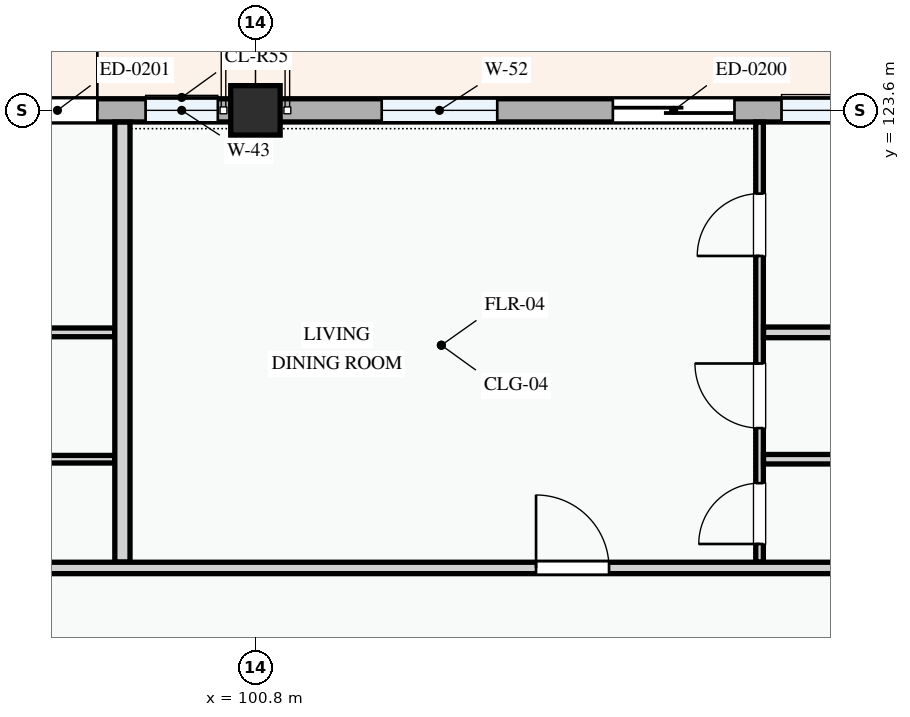
"""IFC4 building model, lengths in metres.
Left out: names, types, materials, properties, quantities, classifications, styles, units other than length and angle.
Written with IfcOpenShell. Run it as: python <this file> out.ifc"""

import sys

from ifc_helpers import new_model, si_unit, direction, frame, frame_2d, origin, origin_2d, place, context, subcontext, project, spatial, rectangle, extrude, element, fill, save


model = new_model("IFC4")
c1 = context("Model", 3, precision=1e-05, world=origin(), true_north=direction((0.0, 1.0)))
c2 = subcontext(c1, "Body", "Model", "MODEL_VIEW")
j1 = project(units=[si_unit("LENGTHUNIT", "METRE"), si_unit("PLANEANGLEUNIT", "RADIAN")], contexts=[c1])
p1 = place(None, origin())
s1 = spatial("IfcSite", under=j1, at=p1, CompositionType="ELEMENT")
p2 = place(p1, origin())
s2 = spatial("IfcBuilding", under=s1, at=p2, CompositionType="ELEMENT")
p3 = place(p2, frame((0.0, 0.0, 21.3)))
s3 = spatial("IfcBuildingStorey", under=s2, at=p3, CompositionType="ELEMENT", Elevation=21.3)
p4 = place(p3, frame((100.8, 123.6, 0.0), z_axis=(0.0, 0.0, 1.0), x_axis=(1.0, 0.0, 0.0)))
e1 = element("IfcColumn", 1, at=p4, inside=s3, PredefinedType="COLUMN", context=c2, shape_type="SweptSolid", body=[
    extrude(rectangle(XDim=0.65, YDim=0.65, at=origin_2d()), origin(), (0.0, 0.0, 1.0), 3.3),
])
p5 = place(p3, frame((109.2, 123.6, 0.0), z_axis=(0.0, 0.0, 1.0), x_axis=(-1.0, 0.0, 0.0)))
e2 = element("IfcWall", 2, at=p5, inside=s3, PredefinedType="STANDARD", context=c2, shape_type="SweptSolid", body=[
    extrude(rectangle(XDim=8.4, YDim=0.305, at=frame_2d((4.2, 0.0))), origin(), (0.0, 0.0, 1.0), 2.345),
])
p6 = place(p5, frame((2.098, 0.0, 0.0)))
e3 = element("IfcOpeningElement", 3, at=p6, cuts=e2, PredefinedType="OPENING", context=c2, shape_type="SweptSolid", body=[
    extrude(rectangle(XDim=1.6, YDim=2.2, at=frame_2d((0.8, 1.1))), frame((0.0, 0.163, 0.0), z_axis=(0.0, -1.0, 0.0), x_axis=(1.0, 0.0, 0.0)), (0.0, 0.0, 1.0), 0.325),
])
p7 = place(p5, frame((0.479, 0.0, 0.78)))
e4 = element("IfcOpeningElement", 4, at=p7, cuts=e2, PredefinedType="OPENING", context=c2, shape_type="SweptSolid", body=[
    extrude(rectangle(XDim=1.0, YDim=1.25, at=frame_2d((0.5, 0.625))), frame((0.0, 0.163, 0.0), z_axis=(0.0, -1.0, 0.0), x_axis=(1.0, 0.0, 0.0)), (0.0, 0.0, 1.0), 0.325),
])
p8 = place(p5, frame((5.219, 0.0, 0.78)))
e5 = element("IfcOpeningElement", 5, at=p8, cuts=e2, PredefinedType="OPENING", context=c2, shape_type="SweptSolid", body=[
    extrude(rectangle(XDim=1.52, YDim=1.42, at=frame_2d((0.76, 0.71))), frame((0.0, 0.163, 0.0), z_axis=(0.0, -1.0, 0.0), x_axis=(1.0, 0.0, 0.0)), (0.0, 0.0, 1.0), 0.325),
])
p9 = place(p3, frame((100.8, 123.6, 0.0), z_axis=(0.0, 0.0, 1.0), x_axis=(-1.0, 0.0, 0.0)))
e6 = element("IfcWall", 6, at=p9, inside=s3, PredefinedType="STANDARD", context=c2, shape_type="SweptSolid", body=[
    extrude(rectangle(XDim=6.0, YDim=0.305, at=frame_2d((3.0, 0.0))), origin(), (0.0, 0.0, 1.0), 2.445),
])
p10 = place(p9, frame((2.08, 0.0, 0.0)))
e7 = element("IfcOpeningElement", 7, at=p10, cuts=e6, PredefinedType="OPENING", context=c2, shape_type="SweptSolid", body=[
    extrude(rectangle(XDim=1.05, YDim=2.15, at=frame_2d((0.525, 1.075))), frame((0.0, 0.163, 0.0), z_axis=(0.0, -1.0, 0.0), x_axis=(1.0, 0.0, 0.0)), (0.0, 0.0, 1.0), 0.325),
])
p11 = place(p9, frame((0.495, 0.0, 0.78)))
e8 = element("IfcOpeningElement", 8, at=p11, cuts=e6, PredefinedType="OPENING", context=c2, shape_type="SweptSolid", body=[
    extrude(rectangle(XDim=0.95, YDim=1.15, at=frame_2d((0.475, 0.575))), frame((0.0, 0.163, 0.0), z_axis=(0.0, -1.0, 0.0), x_axis=(1.0, 0.0, 0.0)), (0.0, 0.0, 1.0), 0.325),
])
p12 = place(p9, frame((3.895, 0.0, 0.78)))
e9 = element("IfcOpeningElement", 9, at=p12, cuts=e6, PredefinedType="OPENING", context=c2, shape_type="SweptSolid", body=[
    extrude(rectangle(XDim=1.2, YDim=1.5, at=frame_2d((0.6, 0.75))), frame((0.0, 0.163, 0.0), z_axis=(0.0, -1.0, 0.0), x_axis=(1.0, 0.0, 0.0)), (0.0, 0.0, 1.0), 0.325),
])
p13 = place(p3, frame((89.448, 120.679, 0.0), z_axis=(0.0, 0.0, 1.0), x_axis=(1.0, 0.0, 0.0)))
e10 = element("IfcWall", 10, at=p13, inside=s3, PredefinedType="PARTITIONING", context=c2, shape_type="SweptSolid", body=[
    extrude(rectangle(XDim=9.5, YDim=0.115, at=frame_2d((4.75, 0.0))), origin(), (0.0, 0.0, 1.0), 3.0),
])
p14 = place(p3, frame((89.448, 119.01, 0.0), z_axis=(0.0, 0.0, 1.0), x_axis=(1.0, 0.0, 0.0)))
e11 = element("IfcWall", 11, at=p14, inside=s3, PredefinedType="PARTITIONING", context=c2, shape_type="SweptSolid", body=[
    extrude(rectangle(XDim=9.5, YDim=0.1, at=frame_2d((4.75, 0.0))), origin(), (0.0, 0.0, 1.0), 3.0),
])
p15 = place(p3, frame((107.432, 117.657, 0.0), z_axis=(0.0, 0.0, 1.0), x_axis=(0.0, 1.0, 0.0)))
e12 = element("IfcWall", 12, at=p15, inside=s3, PredefinedType="PARTITIONING", context=c2, shape_type="SweptSolid", body=[
    extrude(rectangle(XDim=5.789, YDim=0.1, at=frame_2d((2.894, 0.0))), origin(), (0.0, 0.0, 1.0), 3.0),
])
p16 = place(p15, frame((0.238, 0.0, 0.0)))
e13 = element("IfcOpeningElement", 13, at=p16, cuts=e12, PredefinedType="OPENING", context=c2, shape_type="SweptSolid", body=[
    extrude(rectangle(XDim=0.8, YDim=2.1, at=frame_2d((0.4, 1.05))), frame((0.0, 0.06, 0.0), z_axis=(0.0, -1.0, 0.0), x_axis=(1.0, 0.0, 0.0)), (0.0, 0.0, 1.0), 0.12),
])
p17 = place(p15, frame((1.763, 0.0, 0.0)))
e14 = element("IfcOpeningElement", 14, at=p17, cuts=e12, PredefinedType="OPENING", context=c2, shape_type="SweptSolid", body=[
    extrude(rectangle(XDim=0.85, YDim=2.1, at=frame_2d((0.425, 1.05))), frame((0.0, 0.06, 0.0), z_axis=(0.0, -1.0, 0.0), x_axis=(1.0, 0.0, 0.0)), (0.0, 0.0, 1.0), 0.12),
])
p18 = place(p15, frame((4.028, 0.0, 0.0)))
e15 = element("IfcOpeningElement", 15, at=p18, cuts=e12, PredefinedType="OPENING", context=c2, shape_type="SweptSolid", body=[
    extrude(rectangle(XDim=0.82, YDim=2.08, at=frame_2d((0.41, 1.04))), frame((0.0, 0.06, 0.0), z_axis=(0.0, -1.0, 0.0), x_axis=(1.0, 0.0, 0.0)), (0.0, 0.0, 1.0), 0.12),
])
p19 = place(p3, frame((107.484, 120.679, 0.0), z_axis=(0.0, 0.0, 1.0), x_axis=(1.0, 0.0, 0.0)))
e16 = element("IfcWall", 16, at=p19, inside=s3, PredefinedType="PARTITIONING", context=c2, shape_type="SweptSolid", body=[
    extrude(rectangle(XDim=11.851, YDim=0.14, at=frame_2d((5.926, 0.0))), origin(), (0.0, 0.0, 1.0), 3.0),
])
p20 = place(p3, frame((107.484, 119.01, 0.0), z_axis=(0.0, 0.0, 1.0), x_axis=(1.0, 0.0, 0.0)))
e17 = element("IfcWall", 17, at=p20, inside=s3, PredefinedType="PARTITIONING", context=c2, shape_type="SweptSolid", body=[
    extrude(rectangle(XDim=11.851, YDim=0.125, at=frame_2d((5.926, 0.0))), origin(), (0.0, 0.0, 1.0), 3.0),
])
p21 = place(p3, frame((99.05, 117.657, 0.0), z_axis=(0.0, 0.0, 1.0), x_axis=(0.0, 1.0, 0.0)))
e18 = element("IfcWall", 18, at=p21, inside=s3, PredefinedType="PARTITIONING", context=c2, shape_type="SweptSolid", body=[
    extrude(rectangle(XDim=5.789, YDim=0.2, at=frame_2d((2.894, 0.0))), origin(), (0.0, 0.0, 1.0), 3.0),
])
p22 = place(p3, frame((80.554, 117.58, 0.0), z_axis=(0.0, 0.0, 1.0), x_axis=(1.0, 0.0, 0.0)))
e19 = element("IfcWall", 19, at=p22, inside=s3, PredefinedType="PARTITIONING", context=c2, shape_type="SweptSolid", body=[
    extrude(rectangle(XDim=71.986, YDim=0.15, at=frame_2d((35.993, 0.0))), origin(), (0.0, 0.0, 1.0), 3.0),
])
p23 = place(p22, frame((2.254, 0.0, 0.0)))
e20 = element("IfcOpeningElement", 20, at=p23, cuts=e19, PredefinedType="OPENING", context=c2, shape_type="SweptSolid", body=[
    extrude(rectangle(XDim=0.92, YDim=2.1, at=frame_2d((0.46, 1.05))), frame((0.0, 0.085, 0.0), z_axis=(0.0, -1.0, 0.0), x_axis=(1.0, 0.0, 0.0)), (0.0, 0.0, 1.0), 0.17),
])
p24 = place(p22, frame((23.937, 0.0, 0.0)))
e21 = element("IfcOpeningElement", 21, at=p24, cuts=e19, PredefinedType="OPENING", context=c2, shape_type="SweptSolid", body=[
    extrude(rectangle(XDim=0.96, YDim=2.12, at=frame_2d((0.48, 1.06))), frame((0.0, 0.085, 0.0), z_axis=(0.0, -1.0, 0.0), x_axis=(1.0, 0.0, 0.0)), (0.0, 0.0, 1.0), 0.17),
])
p25 = place(p22, frame((39.125, 0.0, 0.0)))
e22 = element("IfcOpeningElement", 22, at=p25, cuts=e19, PredefinedType="OPENING", context=c2, shape_type="SweptSolid", body=[
    extrude(rectangle(XDim=0.92, YDim=2.1, at=frame_2d((0.46, 1.05))), frame((0.0, 0.085, 0.0), z_axis=(0.0, -1.0, 0.0), x_axis=(1.0, 0.0, 0.0)), (0.0, 0.0, 1.0), 0.17),
])
p26 = place(p22, frame((59.922, 0.0, 0.0)))
e23 = element("IfcOpeningElement", 23, at=p26, cuts=e19, PredefinedType="OPENING", context=c2, shape_type="SweptSolid", body=[
    extrude(rectangle(XDim=0.92, YDim=2.1, at=frame_2d((0.46, 1.05))), frame((0.0, 0.085, 0.0), z_axis=(0.0, -1.0, 0.0), x_axis=(1.0, 0.0, 0.0)), (0.0, 0.0, 1.0), 0.17),
])
p27 = place(p6, frame((1.6, 0.0, 0.0), z_axis=(0.0, 0.0, 1.0), x_axis=(-1.0, 0.0, 0.0)))
e24 = element("IfcDoor", 24, at=p27, inside=s3, OperationType="SLIDING_TO_LEFT", PredefinedType="DOOR", context=c2, shape_type="SweptSolid", body=[
    extrude(rectangle(XDim=1.6, YDim=2.2, at=frame_2d((0.8, 1.1))), frame((0.0, 0.025, 0.0), z_axis=(0.0, -1.0, 0.0), x_axis=(1.0, 0.0, 0.0)), (0.0, 0.0, 1.0), 0.05),
])
fill(e3, e24)
p28 = place(p7, origin())
e25 = element("IfcWindow", 25, at=p28, inside=s3, PartitioningType="SINGLE_PANEL", PredefinedType="WINDOW", context=c2, shape_type="SweptSolid", body=[
    extrude(rectangle(XDim=1.0, YDim=1.25, at=frame_2d((0.5, 0.625))), frame((0.0, 0.03, 0.0), z_axis=(0.0, -1.0, 0.0), x_axis=(1.0, 0.0, 0.0)), (0.0, 0.0, 1.0), 0.06),
])
fill(e4, e25)
p29 = place(p8, origin())
e26 = element("IfcWindow", 26, at=p29, inside=s3, PartitioningType="SINGLE_PANEL", PredefinedType="WINDOW", context=c2, shape_type="SweptSolid", body=[
    extrude(rectangle(XDim=1.52, YDim=1.42, at=frame_2d((0.76, 0.71))), frame((0.0, 0.03, 0.0), z_axis=(0.0, -1.0, 0.0), x_axis=(1.0, 0.0, 0.0)), (0.0, 0.0, 1.0), 0.06),
])
fill(e5, e26)
p30 = place(p10, frame((1.05, 0.0, 0.0), z_axis=(0.0, 0.0, 1.0), x_axis=(-1.0, 0.0, 0.0)))
e27 = element("IfcDoor", 27, at=p30, inside=s3, OperationType="SINGLE_SWING_RIGHT", PredefinedType="DOOR", context=c2, shape_type="SweptSolid", body=[
    extrude(rectangle(XDim=1.05, YDim=2.15, at=frame_2d((0.525, 1.075))), frame((0.0, 0.025, 0.0), z_axis=(0.0, -1.0, 0.0), x_axis=(1.0, 0.0, 0.0)), (0.0, 0.0, 1.0), 0.05),
])
fill(e7, e27)
p31 = place(p11, origin())
e28 = element("IfcWindow", 28, at=p31, inside=s3, PartitioningType="SINGLE_PANEL", PredefinedType="WINDOW", context=c2, shape_type="SweptSolid", body=[
    extrude(rectangle(XDim=0.95, YDim=1.15, at=frame_2d((0.475, 0.575))), frame((0.0, 0.03, 0.0), z_axis=(0.0, -1.0, 0.0), x_axis=(1.0, 0.0, 0.0)), (0.0, 0.0, 1.0), 0.06),
])
fill(e8, e28)
p32 = place(p16, origin())
e29 = element("IfcDoor", 29, at=p32, inside=s3, OperationType="SINGLE_SWING_LEFT", PredefinedType="DOOR", context=c2, shape_type="SweptSolid", body=[
    extrude(rectangle(XDim=0.8, YDim=2.1, at=frame_2d((0.4, 1.05))), frame((0.0, 0.025, 0.0), z_axis=(0.0, -1.0, 0.0), x_axis=(1.0, 0.0, 0.0)), (0.0, 0.0, 1.0), 0.05),
])
fill(e13, e29)
p33 = place(p17, origin())
e30 = element("IfcDoor", 30, at=p33, inside=s3, OperationType="SINGLE_SWING_RIGHT", PredefinedType="DOOR", context=c2, shape_type="SweptSolid", body=[
    extrude(rectangle(XDim=0.85, YDim=2.1, at=frame_2d((0.425, 1.05))), frame((0.0, 0.025, 0.0), z_axis=(0.0, -1.0, 0.0), x_axis=(1.0, 0.0, 0.0)), (0.0, 0.0, 1.0), 0.05),
])
fill(e14, e30)
p34 = place(p18, origin())
e31 = element("IfcDoor", 31, at=p34, inside=s3, OperationType="SINGLE_SWING_LEFT", PredefinedType="DOOR", context=c2, shape_type="SweptSolid", body=[
    extrude(rectangle(XDim=0.82, YDim=2.08, at=frame_2d((0.41, 1.04))), frame((0.0, 0.025, 0.0), z_axis=(0.0, -1.0, 0.0), x_axis=(1.0, 0.0, 0.0)), (0.0, 0.0, 1.0), 0.05),
])
fill(e15, e31)
p35 = place(p24, origin())
e32 = element("IfcDoor", 32, at=p35, inside=s3, OperationType="SINGLE_SWING_LEFT", PredefinedType="DOOR", context=c2, shape_type="SweptSolid", body=[
    extrude(rectangle(XDim=0.96, YDim=2.12, at=frame_2d((0.48, 1.06))), frame((0.0, 0.025, 0.0), z_axis=(0.0, -1.0, 0.0), x_axis=(1.0, 0.0, 0.0)), (0.0, 0.0, 1.0), 0.05),
])
fill(e21, e32)
save(model, sys.argv[1])
